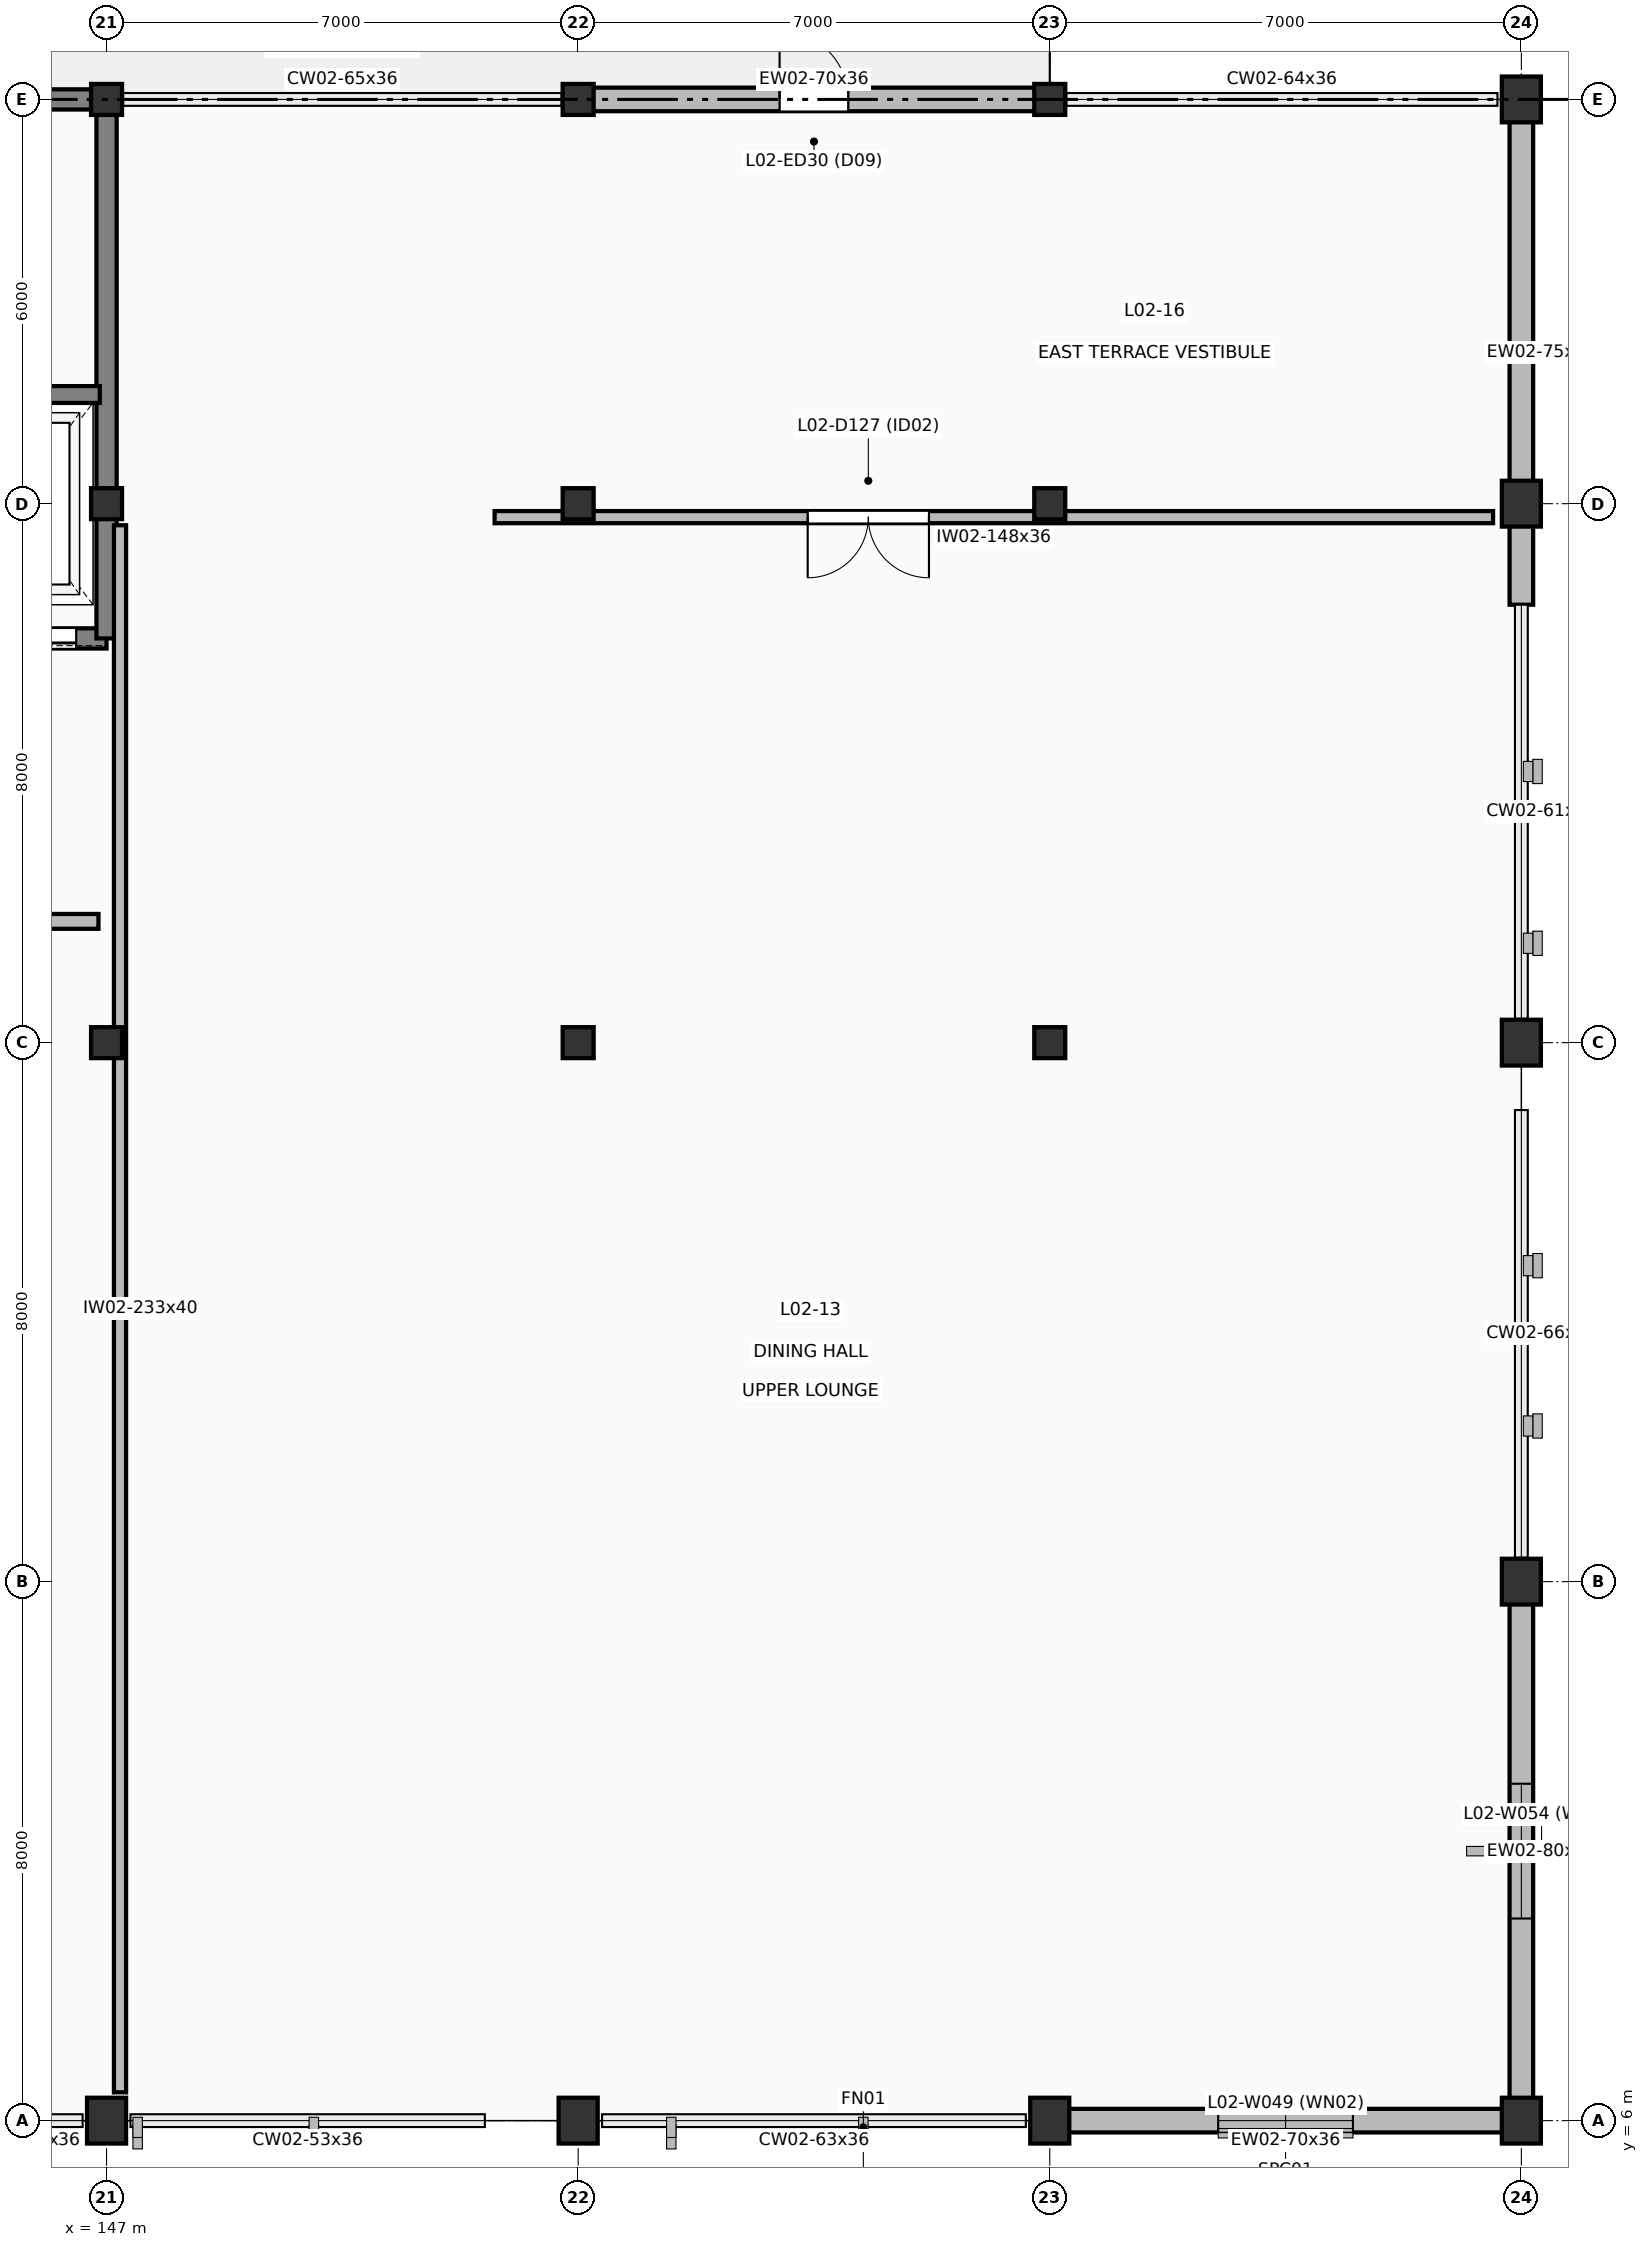
"""IFC4 building model, lengths in metres.
Left out: names, types, materials, properties, quantities, classifications, styles, units other than length and angle.
Written with IfcOpenShell. Run it as: python <this file> out.ifc"""

import sys

from ifc_helpers import new_model, si_unit, direction, frame, frame_2d, origin, origin_2d, place, context, subcontext, project, spatial, rectangle, extrude, element, fill, save


model = new_model("IFC4")
c1 = context("Model", 3, precision=1e-05, world=origin(), true_north=direction((0.0, 1.0)))
c2 = subcontext(c1, "Body", "Model", "MODEL_VIEW")
j1 = project(units=[si_unit("LENGTHUNIT", "METRE"), si_unit("PLANEANGLEUNIT", "RADIAN")], contexts=[c1])
p1 = place(None, origin())
s1 = spatial("IfcSite", under=j1, at=p1, CompositionType="ELEMENT")
p2 = place(p1, origin())
s2 = spatial("IfcBuilding", under=s1, at=p2, CompositionType="ELEMENT")
p3 = place(p2, frame((0.0, 0.0, 9.6)))
s3 = spatial("IfcBuildingStorey", under=s2, at=p3, CompositionType="ELEMENT", Elevation=9.6)
p4 = place(p3, frame((147.0, 6.0, 0.0), z_axis=(0.0, 0.0, 1.0), x_axis=(1.0, 0.0, 0.0)))
e1 = element("IfcColumn", 1, at=p4, inside=s3, PredefinedType="PILASTER", context=c2, shape_type="SweptSolid", body=[
    extrude(rectangle(XDim=0.58, YDim=0.68, at=origin_2d()), origin(), (0.0, 0.0, 1.0), 4.2),
])
for number, where, z_axis, x_axis in (
    (2, (147.0, 22.0, 0.0), (0.0, 0.0, 1.0), (1.0, 0.0, 0.0)),
    (3, (147.0, 30.0, 0.0), (0.0, 0.0, 1.0), (1.0, 0.0, 0.0)),
    (4, (147.0, 36.0, 0.0), (0.0, 0.0, 1.0), (1.0, 0.0, 0.0)),
):
    element("IfcColumn", number, at=place(p3, frame(where, z_axis=z_axis, x_axis=x_axis)), inside=s3, PredefinedType="COLUMN", context=c2, shape_type="SweptSolid", body=[
        extrude(rectangle(XDim=0.46, YDim=0.46, at=origin_2d()), origin(), (0.0, 0.0, 1.0), 4.2),
    ])
p5 = place(p3, frame((154.0, 6.0, 0.0), z_axis=(0.0, 0.0, 1.0), x_axis=(1.0, 0.0, 0.0)))
e5 = element("IfcColumn", 5, at=p5, inside=s3, PredefinedType="PILASTER", context=c2, shape_type="SweptSolid", body=[
    extrude(rectangle(XDim=0.58, YDim=0.68, at=origin_2d()), origin(), (0.0, 0.0, 1.0), 4.2),
])
for number, where, z_axis, x_axis in (
    (6, (154.0, 22.0, 0.0), (0.0, 0.0, 1.0), (1.0, 0.0, 0.0)),
    (7, (154.0, 30.0, 0.0), (0.0, 0.0, 1.0), (1.0, 0.0, 0.0)),
    (8, (154.0, 36.0, 0.0), (0.0, 0.0, 1.0), (1.0, 0.0, 0.0)),
):
    element("IfcColumn", number, at=place(p3, frame(where, z_axis=z_axis, x_axis=x_axis)), inside=s3, PredefinedType="COLUMN", context=c2, shape_type="SweptSolid", body=[
        extrude(rectangle(XDim=0.46, YDim=0.46, at=origin_2d()), origin(), (0.0, 0.0, 1.0), 4.2),
    ])
p6 = place(p3, frame((161.0, 6.0, 0.0), z_axis=(0.0, 0.0, 1.0), x_axis=(1.0, 0.0, 0.0)))
e9 = element("IfcColumn", 9, at=p6, inside=s3, PredefinedType="PILASTER", context=c2, shape_type="SweptSolid", body=[
    extrude(rectangle(XDim=0.58, YDim=0.68, at=origin_2d()), origin(), (0.0, 0.0, 1.0), 4.2),
])
for number, where, z_axis, x_axis in (
    (10, (161.0, 22.0, 0.0), (0.0, 0.0, 1.0), (1.0, 0.0, 0.0)),
    (11, (161.0, 30.0, 0.0), (0.0, 0.0, 1.0), (1.0, 0.0, 0.0)),
    (12, (161.0, 36.0, 0.0), (0.0, 0.0, 1.0), (1.0, 0.0, 0.0)),
):
    element("IfcColumn", number, at=place(p3, frame(where, z_axis=z_axis, x_axis=x_axis)), inside=s3, PredefinedType="COLUMN", context=c2, shape_type="SweptSolid", body=[
        extrude(rectangle(XDim=0.46, YDim=0.46, at=origin_2d()), origin(), (0.0, 0.0, 1.0), 4.2),
    ])
for number, where, z_axis, x_axis in (
    (13, (168.0, 6.0, 0.0), (0.0, 0.0, 1.0), (1.0, 0.0, 0.0)),
    (14, (168.0, 14.0, 0.0), (0.0, 0.0, 1.0), (1.0, 0.0, 0.0)),
    (15, (168.0, 22.0, 0.0), (0.0, 0.0, 1.0), (1.0, 0.0, 0.0)),
    (16, (168.0, 30.0, 0.0), (0.0, 0.0, 1.0), (1.0, 0.0, 0.0)),
    (17, (168.0, 36.0, 0.0), (0.0, 0.0, 1.0), (1.0, 0.0, 0.0)),
):
    element("IfcColumn", number, at=place(p3, frame(where, z_axis=z_axis, x_axis=x_axis)), inside=s3, PredefinedType="PILASTER", context=c2, shape_type="SweptSolid", body=[
        extrude(rectangle(XDim=0.58, YDim=0.68, at=origin_2d()), origin(), (0.0, 0.0, 1.0), 4.2),
    ])
p7 = place(p3, frame((168.0, 6.0, 0.0), z_axis=(0.0, 0.0, 1.0), x_axis=(-1.0, 0.0, 0.0)))
e18 = element("IfcWall", 18, at=p7, inside=s3, PredefinedType="SOLIDWALL", context=c2, shape_type="SweptSolid", body=[
    extrude(rectangle(XDim=7.0, YDim=0.35, at=frame_2d((3.5, 0.0))), origin(), (0.0, 0.0, 1.0), 3.58),
])
p8 = place(p7, frame((2.5, 0.0, 0.9)))
e19 = element("IfcOpeningElement", 19, at=p8, cuts=e18, PredefinedType="OPENING", context=c2, shape_type="SweptSolid", body=[
    extrude(rectangle(XDim=2.0, YDim=2.2, at=frame_2d((1.0, 1.1))), frame((0.0, 0.185, 0.0), z_axis=(0.0, -1.0, 0.0), x_axis=(1.0, 0.0, 0.0)), (0.0, 0.0, 1.0), 0.37),
])
p9 = place(p3, frame((140.0, 36.0, 0.0), z_axis=(0.0, 0.0, 1.0), x_axis=(1.0, 0.0, 0.0)))
e20 = element("IfcWall", 20, at=p9, inside=s3, PredefinedType="SOLIDWALL", context=c2, shape_type="SweptSolid", body=[
    extrude(rectangle(XDim=7.0, YDim=0.3, at=frame_2d((3.5, 0.0))), origin(), (0.0, 0.0, 1.0), 4.2),
])
p10 = place(p3, frame((154.0, 36.0, 0.0), z_axis=(0.0, 0.0, 1.0), x_axis=(1.0, 0.0, 0.0)))
e21 = element("IfcWall", 21, at=p10, inside=s3, PredefinedType="SOLIDWALL", context=c2, shape_type="SweptSolid", body=[
    extrude(rectangle(XDim=7.0, YDim=0.35, at=frame_2d((3.5, 0.0))), origin(), (0.0, 0.0, 1.0), 3.58),
])
p11 = place(p10, frame((2.99, 0.0, 0.0)))
e22 = element("IfcOpeningElement", 22, at=p11, cuts=e21, PredefinedType="OPENING", context=c2, shape_type="SweptSolid", body=[
    extrude(rectangle(XDim=1.02, YDim=2.18, at=frame_2d((0.51, 1.09))), frame((0.0, 0.185, 0.0), z_axis=(0.0, -1.0, 0.0), x_axis=(1.0, 0.0, 0.0)), (0.0, 0.0, 1.0), 0.37),
])
p12 = place(p3, frame((168.0, 36.0, 0.0), z_axis=(0.0, 0.0, 1.0), x_axis=(0.0, -1.0, 0.0)))
e23 = element("IfcWall", 23, at=p12, inside=s3, PredefinedType="SOLIDWALL", context=c2, shape_type="SweptSolid", body=[
    extrude(rectangle(XDim=7.5, YDim=0.35, at=frame_2d((3.75, 0.0))), origin(), (0.0, 0.0, 1.0), 3.465),
])
p13 = place(p3, frame((168.0, 14.0, 0.0), z_axis=(0.0, 0.0, 1.0), x_axis=(0.0, -1.0, 0.0)))
e24 = element("IfcWall", 24, at=p13, inside=s3, PredefinedType="SOLIDWALL", context=c2, shape_type="SweptSolid", body=[
    extrude(rectangle(XDim=8.0, YDim=0.35, at=frame_2d((4.0, 0.0))), origin(), (0.0, 0.0, 1.0), 3.465),
])
p14 = place(p13, frame((3.0, 0.0, 0.9)))
e25 = element("IfcOpeningElement", 25, at=p14, cuts=e24, PredefinedType="OPENING", context=c2, shape_type="SweptSolid", body=[
    extrude(rectangle(XDim=2.0, YDim=2.2, at=frame_2d((1.0, 1.1))), frame((0.0, 0.185, 0.0), z_axis=(0.0, -1.0, 0.0), x_axis=(1.0, 0.0, 0.0)), (0.0, 0.0, 1.0), 0.37),
])
p15 = place(p3, frame((147.0, 28.0, 0.0), z_axis=(0.0, 0.0, 1.0), x_axis=(-1.0, 0.0, 0.0)))
e26 = element("IfcWall", 26, at=p15, inside=s3, PredefinedType="SHEAR", context=c2, shape_type="SweptSolid", body=[
    extrude(rectangle(XDim=7.0, YDim=0.3, at=frame_2d((3.5, 0.0))), origin(), (0.0, 0.0, 1.0), 4.2),
])
p16 = place(p15, frame((4.15, 0.0, 0.0)))
e27 = element("IfcOpeningElement", 27, at=p16, cuts=e26, PredefinedType="OPENING", context=c2, shape_type="SweptSolid", body=[
    extrude(rectangle(XDim=1.1, YDim=2.2, at=frame_2d((0.55, 1.1))), frame((0.0, 0.16, 0.0), z_axis=(0.0, -1.0, 0.0), x_axis=(1.0, 0.0, 0.0)), (0.0, 0.0, 1.0), 0.32),
])
p17 = place(p15, frame((0.45, 0.0, 0.0)))
e28 = element("IfcOpeningElement", 28, at=p17, cuts=e26, PredefinedType="OPENING", context=c2, shape_type="SweptSolid", body=[
    extrude(rectangle(XDim=1.1, YDim=2.2, at=frame_2d((0.55, 1.1))), frame((0.0, 0.16, 0.0), z_axis=(0.0, -1.0, 0.0), x_axis=(1.0, 0.0, 0.0)), (0.0, 0.0, 1.0), 0.32),
])
p18 = place(p3, frame((147.0, 36.0, 0.0), z_axis=(0.0, 0.0, 1.0), x_axis=(0.0, -1.0, 0.0)))
e29 = element("IfcWall", 29, at=p18, inside=s3, PredefinedType="SHEAR", context=c2, shape_type="SweptSolid", body=[
    extrude(rectangle(XDim=8.0, YDim=0.3, at=frame_2d((4.0, 0.0))), origin(), (0.0, 0.0, 1.0), 4.2),
])
p19 = place(p3, frame((144.4, 31.62, 0.0), z_axis=(0.0, 0.0, 1.0), x_axis=(1.0, 0.0, 0.0)))
e30 = element("IfcWall", 30, at=p19, inside=s3, PredefinedType="SHEAR", context=c2, shape_type="SweptSolid", body=[
    extrude(rectangle(XDim=2.5, YDim=0.25, at=frame_2d((1.25, 0.0))), origin(), (0.0, 0.0, 1.0), 4.2),
])
p20 = place(p3, frame((167.58, 29.8, 0.0), z_axis=(0.0, 0.0, 1.0), x_axis=(-1.0, 0.0, 0.0)))
e31 = element("IfcWall", 31, at=p20, inside=s3, PredefinedType="PARTITIONING", context=c2, shape_type="SweptSolid", body=[
    extrude(rectangle(XDim=14.82, YDim=0.18, at=frame_2d((7.41, 0.0))), origin(), (0.0, 0.0, 1.0), 3.58),
])
p21 = place(p20, frame((8.373, 0.0, 0.0)))
e32 = element("IfcOpeningElement", 32, at=p21, cuts=e31, PredefinedType="OPENING", context=c2, shape_type="SweptSolid", body=[
    extrude(rectangle(XDim=1.8, YDim=2.3, at=frame_2d((0.9, 1.15))), frame((0.0, 0.1, 0.0), z_axis=(0.0, -1.0, 0.0), x_axis=(1.0, 0.0, 0.0)), (0.0, 0.0, 1.0), 0.2),
])
p22 = place(p3, frame((147.2, 29.68, 0.0), z_axis=(0.0, 0.0, 1.0), x_axis=(0.0, -1.0, 0.0)))
e33 = element("IfcWall", 33, at=p22, inside=s3, PredefinedType="PARTITIONING", context=c2, shape_type="SweptSolid", body=[
    extrude(rectangle(XDim=23.26, YDim=0.18, at=frame_2d((11.63, 0.0))), origin(), (0.0, 0.0, 1.0), 3.98),
])
p23 = place(p3, frame((146.88, 23.8, 0.0), z_axis=(0.0, 0.0, 1.0), x_axis=(-1.0, 0.0, 0.0)))
e34 = element("IfcWall", 34, at=p23, inside=s3, PredefinedType="SOLIDWALL", context=c2, shape_type="SweptSolid", body=[
    extrude(rectangle(XDim=6.46, YDim=0.22, at=frame_2d((3.23, 0.0))), origin(), (0.0, 0.0, 1.0), 3.98),
])
p24 = place(p23, frame((2.705, 0.0, 0.0)))
e35 = element("IfcOpeningElement", 35, at=p24, cuts=e34, PredefinedType="OPENING", context=c2, shape_type="SweptSolid", body=[
    extrude(rectangle(XDim=1.05, YDim=2.2, at=frame_2d((0.525, 1.1))), frame((0.0, 0.12, 0.0), z_axis=(0.0, -1.0, 0.0), x_axis=(1.0, 0.0, 0.0)), (0.0, 0.0, 1.0), 0.24),
])
p25 = place(p8, origin())
e36 = element("IfcWindow", 36, at=p25, inside=s3, PartitioningType="DOUBLE_PANEL_VERTICAL", PredefinedType="WINDOW", context=c2, shape_type="SweptSolid", body=[
    extrude(rectangle(XDim=2.0, YDim=2.2, at=frame_2d((1.0, 1.1))), frame((0.0, 0.03, 0.0), z_axis=(0.0, -1.0, 0.0), x_axis=(1.0, 0.0, 0.0)), (0.0, 0.0, 1.0), 0.06),
])
fill(e19, e36)
p26 = place(p11, origin())
e37 = element("IfcDoor", 37, at=p26, inside=s3, OperationType="SINGLE_SWING_LEFT", PredefinedType="DOOR", context=c2, shape_type="SweptSolid", body=[
    extrude(rectangle(XDim=1.02, YDim=2.18, at=frame_2d((0.51, 1.09))), frame((0.0, 0.025, 0.0), z_axis=(0.0, -1.0, 0.0), x_axis=(1.0, 0.0, 0.0)), (0.0, 0.0, 1.0), 0.05),
])
fill(e22, e37)
p27 = place(p14, origin())
e38 = element("IfcWindow", 38, at=p27, inside=s3, PartitioningType="DOUBLE_PANEL_VERTICAL", PredefinedType="WINDOW", context=c2, shape_type="SweptSolid", body=[
    extrude(rectangle(XDim=2.0, YDim=2.2, at=frame_2d((1.0, 1.1))), frame((0.0, 0.03, 0.0), z_axis=(0.0, -1.0, 0.0), x_axis=(1.0, 0.0, 0.0)), (0.0, 0.0, 1.0), 0.06),
])
fill(e25, e38)
p28 = place(p17, origin())
e39 = element("IfcDoor", 39, at=p28, inside=s3, OperationType="SLIDING_TO_LEFT", PredefinedType="DOOR", context=c2, shape_type="SweptSolid", body=[
    extrude(rectangle(XDim=1.1, YDim=2.2, at=frame_2d((0.55, 1.1))), frame((0.0, 0.025, 0.0), z_axis=(0.0, -1.0, 0.0), x_axis=(1.0, 0.0, 0.0)), (0.0, 0.0, 1.0), 0.05),
])
fill(e28, e39)
p29 = place(p21, origin())
e40 = element("IfcDoor", 40, at=p29, inside=s3, OperationType="DOUBLE_DOOR_SINGLE_SWING", PredefinedType="DOOR", context=c2, shape_type="SweptSolid", body=[
    extrude(rectangle(XDim=1.8, YDim=2.3, at=frame_2d((0.9, 1.15))), frame((0.0, 0.025, 0.0), z_axis=(0.0, -1.0, 0.0), x_axis=(1.0, 0.0, 0.0)), (0.0, 0.0, 1.0), 0.05),
])
fill(e32, e40)
save(model, sys.argv[1])
